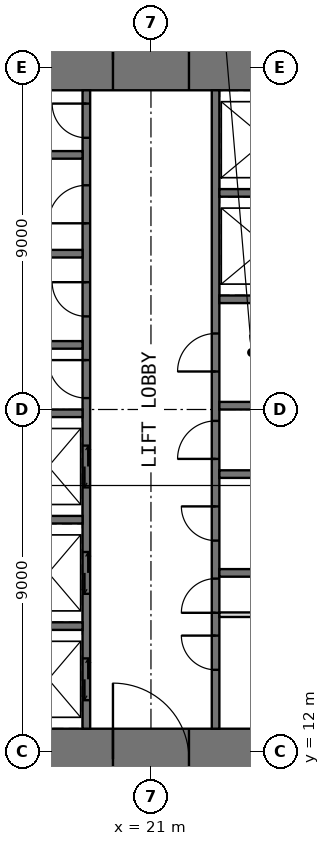
"""IFC4 building model, lengths in metres.
Left out: names, types, materials, properties, quantities, classifications, styles, units other than length and angle.
Written with IfcOpenShell. Run it as: python <this file> out.ifc"""

import sys

from ifc_helpers import new_model, si_unit, direction, frame, frame_2d, origin, place, context, subcontext, project, spatial, rectangle, extrude, element, fill, save


model = new_model("IFC4")
c1 = context("Model", 3, precision=1e-05, world=origin(), true_north=direction((0.0, 1.0)))
c2 = subcontext(c1, "Body", "Model", "MODEL_VIEW")
j1 = project(units=[si_unit("LENGTHUNIT", "METRE"), si_unit("PLANEANGLEUNIT", "RADIAN")], contexts=[c1])
p1 = place(None, origin())
s1 = spatial("IfcSite", under=j1, at=p1, CompositionType="ELEMENT")
p2 = place(p1, origin())
s2 = spatial("IfcBuilding", under=s1, at=p2, CompositionType="ELEMENT")
p3 = place(p2, frame((0.0, 0.0, 156.5)))
s3 = spatial("IfcBuildingStorey", under=s2, at=p3, CompositionType="ELEMENT", Elevation=156.5)
p4 = place(p3, frame((11.0, 11.8, -0.05), z_axis=(0.0, 0.0, 1.0), x_axis=(1.0, 0.0, 0.0)))
e1 = element("IfcWall", 1, at=p4, inside=s3, PredefinedType="SHEAR", context=c2, shape_type="SweptSolid", body=[
    extrude(rectangle(XDim=20.0, YDim=1.6, at=frame_2d((10.0, 0.0))), origin(), (0.0, 0.0, 1.0), 3.8),
])
p5 = place(p4, frame((9.0, 0.0, 0.05)))
e2 = element("IfcOpeningElement", 2, at=p5, cuts=e1, PredefinedType="OPENING", context=c2, shape_type="SweptSolid", body=[
    extrude(rectangle(XDim=2.0, YDim=2.2, at=frame_2d((1.0, 1.1))), frame((0.0, 0.81, 0.0), z_axis=(0.0, -1.0, 0.0), x_axis=(1.0, 0.0, 0.0)), (0.0, 0.0, 1.0), 1.62),
])
p6 = place(p3, frame((11.0, 30.2, -0.05), z_axis=(0.0, 0.0, 1.0), x_axis=(1.0, 0.0, 0.0)))
e3 = element("IfcWall", 3, at=p6, inside=s3, PredefinedType="SHEAR", context=c2, shape_type="SweptSolid", body=[
    extrude(rectangle(XDim=20.0, YDim=1.6, at=frame_2d((10.0, 0.0))), origin(), (0.0, 0.0, 1.0), 3.8),
])
p7 = place(p6, frame((9.0, 0.0, 0.05)))
e4 = element("IfcOpeningElement", 4, at=p7, cuts=e3, PredefinedType="OPENING", context=c2, shape_type="SweptSolid", body=[
    extrude(rectangle(XDim=2.0, YDim=2.2, at=frame_2d((1.0, 1.1))), frame((0.0, 0.81, 0.0), z_axis=(0.0, -1.0, 0.0), x_axis=(1.0, 0.0, 0.0)), (0.0, 0.0, 1.0), 1.62),
])
p8 = place(p3, frame((19.3, 12.6, -0.05), z_axis=(0.0, 0.0, 1.0), x_axis=(0.0, 1.0, 0.0)))
e5 = element("IfcWall", 5, at=p8, inside=s3, PredefinedType="SHEAR", context=c2, shape_type="SweptSolid", body=[
    extrude(rectangle(XDim=16.8, YDim=0.2, at=frame_2d((8.4, 0.0))), origin(), (0.0, 0.0, 1.0), 3.8),
])
p9 = place(p8, frame((8.7, 0.0, 0.05)))
e6 = element("IfcOpeningElement", 6, at=p9, cuts=e5, PredefinedType="OPENING", context=c2, shape_type="SweptSolid", body=[
    extrude(rectangle(XDim=1.0, YDim=2.2, at=frame_2d((0.5, 1.1))), frame((0.0, 0.11, 0.0), z_axis=(0.0, -1.0, 0.0), x_axis=(1.0, 0.0, 0.0)), (0.0, 0.0, 1.0), 0.22),
])
p10 = place(p8, frame((10.85, 0.0, 0.05)))
e7 = element("IfcOpeningElement", 7, at=p10, cuts=e5, PredefinedType="OPENING", context=c2, shape_type="SweptSolid", body=[
    extrude(rectangle(XDim=0.9, YDim=2.2, at=frame_2d((0.45, 1.1))), frame((0.0, 0.11, 0.0), z_axis=(0.0, -1.0, 0.0), x_axis=(1.0, 0.0, 0.0)), (0.0, 0.0, 1.0), 0.22),
])
p11 = place(p8, frame((13.3, 0.0, 0.05)))
e8 = element("IfcOpeningElement", 8, at=p11, cuts=e5, PredefinedType="OPENING", context=c2, shape_type="SweptSolid", body=[
    extrude(rectangle(XDim=1.0, YDim=2.2, at=frame_2d((0.5, 1.1))), frame((0.0, 0.11, 0.0), z_axis=(0.0, -1.0, 0.0), x_axis=(1.0, 0.0, 0.0)), (0.0, 0.0, 1.0), 0.22),
])
p12 = place(p8, frame((15.55, 0.0, 0.05)))
e9 = element("IfcOpeningElement", 9, at=p12, cuts=e5, PredefinedType="OPENING", context=c2, shape_type="SweptSolid", body=[
    extrude(rectangle(XDim=0.9, YDim=2.2, at=frame_2d((0.45, 1.1))), frame((0.0, 0.11, 0.0), z_axis=(0.0, -1.0, 0.0), x_axis=(1.0, 0.0, 0.0)), (0.0, 0.0, 1.0), 0.22),
])
p13 = place(p8, frame((0.75, 0.0, 0.05)))
e10 = element("IfcOpeningElement", 10, at=p13, cuts=e5, PredefinedType="OPENING", context=c2, shape_type="SweptSolid", body=[
    extrude(rectangle(XDim=1.1, YDim=2.2, at=frame_2d((0.55, 1.1))), frame((0.0, 0.11, 0.0), z_axis=(0.0, -1.0, 0.0), x_axis=(1.0, 0.0, 0.0)), (0.0, 0.0, 1.0), 0.22),
])
p14 = place(p8, frame((3.55, 0.0, 0.05)))
e11 = element("IfcOpeningElement", 11, at=p14, cuts=e5, PredefinedType="OPENING", context=c2, shape_type="SweptSolid", body=[
    extrude(rectangle(XDim=1.1, YDim=2.2, at=frame_2d((0.55, 1.1))), frame((0.0, 0.11, 0.0), z_axis=(0.0, -1.0, 0.0), x_axis=(1.0, 0.0, 0.0)), (0.0, 0.0, 1.0), 0.22),
])
p15 = place(p8, frame((6.35, 0.0, 0.05)))
e12 = element("IfcOpeningElement", 12, at=p15, cuts=e5, PredefinedType="OPENING", context=c2, shape_type="SweptSolid", body=[
    extrude(rectangle(XDim=1.1, YDim=2.2, at=frame_2d((0.55, 1.1))), frame((0.0, 0.11, 0.0), z_axis=(0.0, -1.0, 0.0), x_axis=(1.0, 0.0, 0.0)), (0.0, 0.0, 1.0), 0.22),
])
p16 = place(p3, frame((22.7, 12.6, -0.05), z_axis=(0.0, 0.0, 1.0), x_axis=(0.0, 1.0, 0.0)))
e13 = element("IfcWall", 13, at=p16, inside=s3, PredefinedType="SHEAR", context=c2, shape_type="SweptSolid", body=[
    extrude(rectangle(XDim=16.8, YDim=0.2, at=frame_2d((8.4, 0.0))), origin(), (0.0, 0.0, 1.0), 3.8),
])
p17 = place(p16, frame((3.05, 0.0, 0.05)))
e14 = element("IfcOpeningElement", 14, at=p17, cuts=e13, PredefinedType="OPENING", context=c2, shape_type="SweptSolid", body=[
    extrude(rectangle(XDim=0.9, YDim=2.2, at=frame_2d((0.45, 1.1))), frame((0.0, 0.11, 0.0), z_axis=(0.0, -1.0, 0.0), x_axis=(1.0, 0.0, 0.0)), (0.0, 0.0, 1.0), 0.22),
])
p18 = place(p16, frame((7.1, 0.0, 0.05)))
e15 = element("IfcOpeningElement", 15, at=p18, cuts=e13, PredefinedType="OPENING", context=c2, shape_type="SweptSolid", body=[
    extrude(rectangle(XDim=1.0, YDim=2.2, at=frame_2d((0.5, 1.1))), frame((0.0, 0.11, 0.0), z_axis=(0.0, -1.0, 0.0), x_axis=(1.0, 0.0, 0.0)), (0.0, 0.0, 1.0), 0.22),
])
p19 = place(p16, frame((1.55, 0.0, 0.05)))
e16 = element("IfcOpeningElement", 16, at=p19, cuts=e13, PredefinedType="OPENING", context=c2, shape_type="SweptSolid", body=[
    extrude(rectangle(XDim=0.9, YDim=2.2, at=frame_2d((0.45, 1.1))), frame((0.0, 0.11, 0.0), z_axis=(0.0, -1.0, 0.0), x_axis=(1.0, 0.0, 0.0)), (0.0, 0.0, 1.0), 0.22),
])
p20 = place(p16, frame((4.95, 0.0, 0.05)))
e17 = element("IfcOpeningElement", 17, at=p20, cuts=e13, PredefinedType="OPENING", context=c2, shape_type="SweptSolid", body=[
    extrude(rectangle(XDim=0.9, YDim=2.2, at=frame_2d((0.45, 1.1))), frame((0.0, 0.11, 0.0), z_axis=(0.0, -1.0, 0.0), x_axis=(1.0, 0.0, 0.0)), (0.0, 0.0, 1.0), 0.22),
])
p21 = place(p16, frame((9.4, 0.0, 0.05)))
e18 = element("IfcOpeningElement", 18, at=p21, cuts=e13, PredefinedType="OPENING", context=c2, shape_type="SweptSolid", body=[
    extrude(rectangle(XDim=1.0, YDim=2.2, at=frame_2d((0.5, 1.1))), frame((0.0, 0.11, 0.0), z_axis=(0.0, -1.0, 0.0), x_axis=(1.0, 0.0, 0.0)), (0.0, 0.0, 1.0), 0.22),
])
for number, where, z_axis, x_axis in (
    (19, (16.0, 15.3, -0.05), (0.0, 0.0, 1.0), (1.0, 0.0, 0.0)),
    (20, (16.0, 18.1, -0.05), (0.0, 0.0, 1.0), (1.0, 0.0, 0.0)),
    (21, (16.0, 20.9, -0.05), (0.0, 0.0, 1.0), (1.0, 0.0, 0.0)),
    (22, (16.0, 22.7, -0.05), (0.0, 0.0, 1.0), (1.0, 0.0, 0.0)),
    (23, (16.0, 25.1, -0.05), (0.0, 0.0, 1.0), (1.0, 0.0, 0.0)),
    (24, (16.0, 27.7, -0.05), (0.0, 0.0, 1.0), (1.0, 0.0, 0.0)),
    (25, (22.8, 16.7, -0.05), (0.0, 0.0, 1.0), (1.0, 0.0, 0.0)),
    (26, (22.8, 19.3, -0.05), (0.0, 0.0, 1.0), (1.0, 0.0, 0.0)),
    (27, (22.8, 21.1, -0.05), (0.0, 0.0, 1.0), (1.0, 0.0, 0.0)),
    (28, (22.8, 23.9, -0.05), (0.0, 0.0, 1.0), (1.0, 0.0, 0.0)),
    (29, (22.8, 26.7, -0.05), (0.0, 0.0, 1.0), (1.0, 0.0, 0.0)),
):
    element("IfcWall", number, at=place(p3, frame(where, z_axis=z_axis, x_axis=x_axis)), inside=s3, PredefinedType="SHEAR", context=c2, shape_type="SweptSolid", body=[
        extrude(rectangle(XDim=3.2, YDim=0.2, at=frame_2d((1.6, 0.0))), origin(), (0.0, 0.0, 1.0), 3.8),
    ])
p22 = place(p3, frame((22.8, 15.6, 0.0), z_axis=(0.0, 0.0, 1.0), x_axis=(1.0, 0.0, 0.0)))
e30 = element("IfcWall", 30, at=p22, inside=s3, PredefinedType="PARTITIONING", context=c2, shape_type="SweptSolid", body=[
    extrude(rectangle(XDim=3.2, YDim=0.12, at=frame_2d((1.6, 0.0))), origin(), (0.0, 0.0, 1.0), 3.55),
])
p23 = place(p5, origin())
e31 = element("IfcDoor", 31, at=p23, inside=s3, OperationType="DOUBLE_DOOR_SINGLE_SWING", PredefinedType="DOOR", context=c2, shape_type="SweptSolid", body=[
    extrude(rectangle(XDim=2.0, YDim=2.2, at=frame_2d((1.0, 1.1))), frame((0.0, 0.025, 0.0), z_axis=(0.0, -1.0, 0.0), x_axis=(1.0, 0.0, 0.0)), (0.0, 0.0, 1.0), 0.05),
])
fill(e2, e31)
p24 = place(p7, origin())
e32 = element("IfcDoor", 32, at=p24, inside=s3, OperationType="DOUBLE_DOOR_SINGLE_SWING", PredefinedType="DOOR", context=c2, shape_type="SweptSolid", body=[
    extrude(rectangle(XDim=2.0, YDim=2.2, at=frame_2d((1.0, 1.1))), frame((0.0, 0.025, 0.0), z_axis=(0.0, -1.0, 0.0), x_axis=(1.0, 0.0, 0.0)), (0.0, 0.0, 1.0), 0.05),
])
fill(e4, e32)
p25 = place(p17, origin())
e33 = element("IfcDoor", 33, at=p25, inside=s3, OperationType="SINGLE_SWING_LEFT", PredefinedType="DOOR", context=c2, shape_type="SweptSolid", body=[
    extrude(rectangle(XDim=0.9, YDim=2.2, at=frame_2d((0.45, 1.1))), frame((0.0, 0.025, 0.0), z_axis=(0.0, -1.0, 0.0), x_axis=(1.0, 0.0, 0.0)), (0.0, 0.0, 1.0), 0.05),
])
fill(e14, e33)
p26 = place(p9, origin())
e34 = element("IfcDoor", 34, at=p26, inside=s3, OperationType="SINGLE_SWING_RIGHT", PredefinedType="DOOR", context=c2, shape_type="SweptSolid", body=[
    extrude(rectangle(XDim=1.0, YDim=2.2, at=frame_2d((0.5, 1.1))), frame((0.0, 0.025, 0.0), z_axis=(0.0, -1.0, 0.0), x_axis=(1.0, 0.0, 0.0)), (0.0, 0.0, 1.0), 0.05),
])
fill(e6, e34)
p27 = place(p18, origin())
e35 = element("IfcDoor", 35, at=p27, inside=s3, OperationType="SINGLE_SWING_LEFT", PredefinedType="DOOR", context=c2, shape_type="SweptSolid", body=[
    extrude(rectangle(XDim=1.0, YDim=2.2, at=frame_2d((0.5, 1.1))), frame((0.0, 0.025, 0.0), z_axis=(0.0, -1.0, 0.0), x_axis=(1.0, 0.0, 0.0)), (0.0, 0.0, 1.0), 0.05),
])
fill(e15, e35)
p28 = place(p10, origin())
e36 = element("IfcDoor", 36, at=p28, inside=s3, OperationType="SINGLE_SWING_RIGHT", PredefinedType="DOOR", context=c2, shape_type="SweptSolid", body=[
    extrude(rectangle(XDim=0.9, YDim=2.2, at=frame_2d((0.45, 1.1))), frame((0.0, 0.025, 0.0), z_axis=(0.0, -1.0, 0.0), x_axis=(1.0, 0.0, 0.0)), (0.0, 0.0, 1.0), 0.05),
])
fill(e7, e36)
p29 = place(p11, origin())
e37 = element("IfcDoor", 37, at=p29, inside=s3, OperationType="SINGLE_SWING_LEFT", PredefinedType="DOOR", context=c2, shape_type="SweptSolid", body=[
    extrude(rectangle(XDim=1.0, YDim=2.2, at=frame_2d((0.5, 1.1))), frame((0.0, 0.025, 0.0), z_axis=(0.0, -1.0, 0.0), x_axis=(1.0, 0.0, 0.0)), (0.0, 0.0, 1.0), 0.05),
])
fill(e8, e37)
p30 = place(p12, origin())
e38 = element("IfcDoor", 38, at=p30, inside=s3, OperationType="SINGLE_SWING_RIGHT", PredefinedType="DOOR", context=c2, shape_type="SweptSolid", body=[
    extrude(rectangle(XDim=0.9, YDim=2.2, at=frame_2d((0.45, 1.1))), frame((0.0, 0.025, 0.0), z_axis=(0.0, -1.0, 0.0), x_axis=(1.0, 0.0, 0.0)), (0.0, 0.0, 1.0), 0.05),
])
fill(e9, e38)
p31 = place(p19, origin())
e39 = element("IfcDoor", 39, at=p31, inside=s3, OperationType="SINGLE_SWING_RIGHT", PredefinedType="DOOR", context=c2, shape_type="SweptSolid", body=[
    extrude(rectangle(XDim=0.9, YDim=2.2, at=frame_2d((0.45, 1.1))), frame((0.0, 0.025, 0.0), z_axis=(0.0, -1.0, 0.0), x_axis=(1.0, 0.0, 0.0)), (0.0, 0.0, 1.0), 0.05),
])
fill(e16, e39)
p32 = place(p20, origin())
e40 = element("IfcDoor", 40, at=p32, inside=s3, OperationType="SINGLE_SWING_RIGHT", PredefinedType="DOOR", context=c2, shape_type="SweptSolid", body=[
    extrude(rectangle(XDim=0.9, YDim=2.2, at=frame_2d((0.45, 1.1))), frame((0.0, 0.025, 0.0), z_axis=(0.0, -1.0, 0.0), x_axis=(1.0, 0.0, 0.0)), (0.0, 0.0, 1.0), 0.05),
])
fill(e17, e40)
p33 = place(p21, origin())
e41 = element("IfcDoor", 41, at=p33, inside=s3, OperationType="SINGLE_SWING_LEFT", PredefinedType="DOOR", context=c2, shape_type="SweptSolid", body=[
    extrude(rectangle(XDim=1.0, YDim=2.2, at=frame_2d((0.5, 1.1))), frame((0.0, 0.025, 0.0), z_axis=(0.0, -1.0, 0.0), x_axis=(1.0, 0.0, 0.0)), (0.0, 0.0, 1.0), 0.05),
])
fill(e18, e41)
p34 = place(p13, origin())
e42 = element("IfcDoor", 42, at=p34, inside=s3, OperationType="DOUBLE_DOOR_SLIDING", PredefinedType="DOOR", context=c2, shape_type="SweptSolid", body=[
    extrude(rectangle(XDim=1.1, YDim=2.2, at=frame_2d((0.55, 1.1))), frame((0.0, 0.025, 0.0), z_axis=(0.0, -1.0, 0.0), x_axis=(1.0, 0.0, 0.0)), (0.0, 0.0, 1.0), 0.05),
])
fill(e10, e42)
p35 = place(p14, origin())
e43 = element("IfcDoor", 43, at=p35, inside=s3, OperationType="DOUBLE_DOOR_SLIDING", PredefinedType="DOOR", context=c2, shape_type="SweptSolid", body=[
    extrude(rectangle(XDim=1.1, YDim=2.2, at=frame_2d((0.55, 1.1))), frame((0.0, 0.025, 0.0), z_axis=(0.0, -1.0, 0.0), x_axis=(1.0, 0.0, 0.0)), (0.0, 0.0, 1.0), 0.05),
])
fill(e11, e43)
p36 = place(p15, origin())
e44 = element("IfcDoor", 44, at=p36, inside=s3, OperationType="DOUBLE_DOOR_SLIDING", PredefinedType="DOOR", context=c2, shape_type="SweptSolid", body=[
    extrude(rectangle(XDim=1.1, YDim=2.2, at=frame_2d((0.55, 1.1))), frame((0.0, 0.025, 0.0), z_axis=(0.0, -1.0, 0.0), x_axis=(1.0, 0.0, 0.0)), (0.0, 0.0, 1.0), 0.05),
])
fill(e12, e44)
save(model, sys.argv[1])
